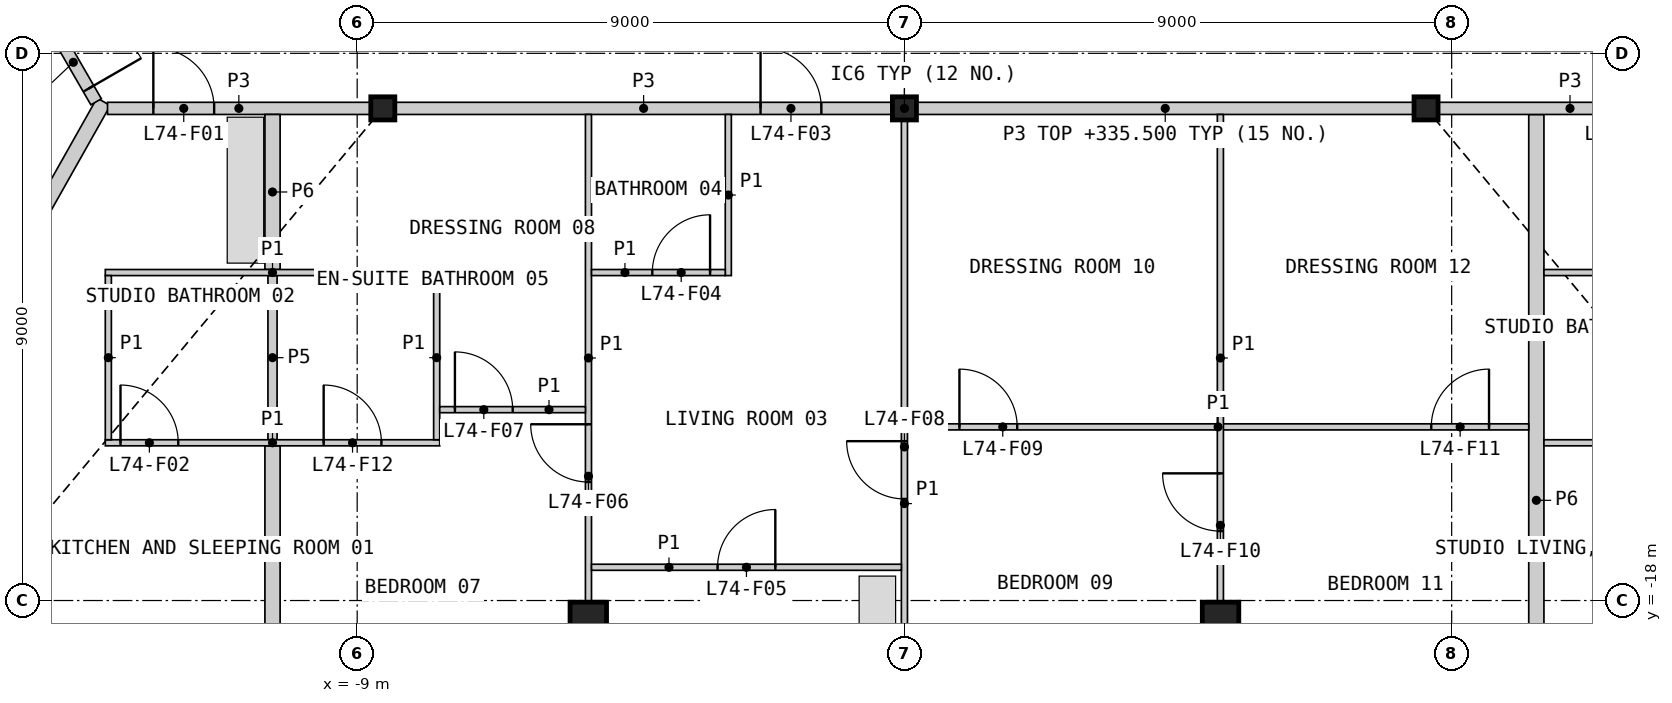
"""IFC4 building model, lengths in metres.
Left out: names, types, materials, properties, quantities, classifications, styles, units other than length and angle.
Written with IfcOpenShell. Run it as: python <this file> out.ifc"""

import sys

from ifc_helpers import new_model, si_unit, direction, frame, frame_2d, origin, origin_2d, place, context, subcontext, project, spatial, rectangle, hollow_rectangle, i_section, extrude, element, fill, save


model = new_model("IFC4")
c1 = context("Model", 3, precision=1e-05, world=origin(), true_north=direction((0.0, 1.0)))
c2 = subcontext(c1, "Body", "Model", "MODEL_VIEW")
j1 = project(units=[si_unit("LENGTHUNIT", "METRE"), si_unit("PLANEANGLEUNIT", "RADIAN")], contexts=[c1])
p1 = place(None, origin())
s1 = spatial("IfcSite", under=j1, at=p1, CompositionType="ELEMENT")
p2 = place(p1, origin())
s2 = spatial("IfcBuilding", under=s1, at=p2, CompositionType="ELEMENT")
p3 = place(p2, frame((0.0, 0.0, 332.4)))
s3 = spatial("IfcBuildingStorey", under=s2, at=p3, CompositionType="ELEMENT", Elevation=332.4)
for number, where, z_axis, x_axis in (
    (1, (-5.199, -18.327, 0.0), (0.0, 0.0, 1.0), (1.0, 0.0, 0.0)),
    (2, (5.199, -18.327, 0.0), (0.0, 0.0, 1.0), (1.0, 0.0, 0.0)),
):
    element("IfcColumn", number, at=place(p3, frame(where, z_axis=z_axis, x_axis=x_axis)), inside=s3, PredefinedType="COLUMN", context=c2, shape_type="SweptSolid", body=[
        extrude(hollow_rectangle(XDim=0.6, YDim=0.6, WallThickness=0.04, at=origin_2d()), origin(), (0.0, 0.0, 1.0), 3.4),
    ])
for number, where, z_axis, x_axis in (
    (3, (-8.578, -9.906, 0.0), (0.0, 0.0, 1.0), (1.0, 0.0, 0.0)),
    (4, (0.0, -9.906, 0.0), (0.0, 0.0, 1.0), (1.0, 0.0, 0.0)),
    (5, (8.578, -9.906, 0.0), (0.0, 0.0, 1.0), (1.0, 0.0, 0.0)),
):
    element("IfcColumn", number, at=place(p3, frame(where, z_axis=z_axis, x_axis=x_axis)), inside=s3, PredefinedType="COLUMN", context=c2, shape_type="SweptSolid", body=[
        extrude(i_section(OverallWidth=0.396, OverallDepth=0.381, WebThickness=0.019, FlangeThickness=0.03, at=origin_2d()), origin(), (0.0, 0.0, 1.0), 3.4),
    ])
p4 = place(p3, frame((-20.376, -22.582, 0.0), z_axis=(0.0, 0.0, 1.0), x_axis=(0.491057132664, 0.871127368678, 0.0)))
e6 = element("IfcWall", 6, at=p4, inside=s3, PredefinedType="PARTITIONING", context=c2, shape_type="SweptSolid", body=[
    extrude(rectangle(XDim=14.677, YDim=0.25, at=frame_2d((7.338, 0.0))), origin(), (0.0, 0.0, 1.0), 2.33),
])
p5 = place(p3, frame((10.393, -22.698, 0.0), z_axis=(0.0, 0.0, 1.0), x_axis=(0.0, 1.0, 0.0)))
e7 = element("IfcWall", 7, at=p5, inside=s3, PredefinedType="PARTITIONING", context=c2, shape_type="SweptSolid", body=[
    extrude(rectangle(XDim=12.692, YDim=0.25, at=frame_2d((6.346, 0.0))), origin(), (0.0, 0.0, 1.0), 2.33),
])
p6 = place(p3, frame((0.208, -9.906, 0.0), z_axis=(0.0, 0.0, 1.0), x_axis=(1.0, 0.0, 0.0)))
e8 = element("IfcWall", 8, at=p6, inside=s3, PredefinedType="PARTITIONING", context=c2, shape_type="SweptSolid", body=[
    extrude(rectangle(XDim=8.163, YDim=0.2, at=frame_2d((4.082, 0.0))), origin(), (0.0, 0.0, 1.0), 3.1),
])
p7 = place(p3, frame((-8.371, -9.906, 0.0), z_axis=(0.0, 0.0, 1.0), x_axis=(1.0, 0.0, 0.0)))
e9 = element("IfcWall", 9, at=p7, inside=s3, PredefinedType="PARTITIONING", context=c2, shape_type="SweptSolid", body=[
    extrude(rectangle(XDim=8.163, YDim=0.2, at=frame_2d((4.082, 0.0))), origin(), (0.0, 0.0, 1.0), 3.1),
])
p8 = place(p7, frame((6.004, 0.0, 0.0)))
e10 = element("IfcOpeningElement", 10, at=p8, cuts=e9, PredefinedType="OPENING", context=c2, shape_type="SweptSolid", body=[
    extrude(rectangle(XDim=1.0, YDim=2.1, at=frame_2d((0.5, 1.05))), frame((0.0, 0.11, 0.0), z_axis=(0.0, -1.0, 0.0), x_axis=(1.0, 0.0, 0.0)), (0.0, 0.0, 1.0), 0.22),
])
p9 = place(p3, frame((-10.393, -22.698, 0.0), z_axis=(0.0, 0.0, 1.0), x_axis=(0.0, 1.0, 0.0)))
e11 = element("IfcWall", 11, at=p9, inside=s3, PredefinedType="PARTITIONING", context=c2, shape_type="SweptSolid", body=[
    extrude(rectangle(XDim=7.242, YDim=0.25, at=frame_2d((3.621, 0.0))), origin(), (0.0, 0.0, 1.0), 2.33),
])
p10 = place(p3, frame((-13.106, -9.906, 0.0), z_axis=(0.0, 0.0, 1.0), x_axis=(1.0, 0.0, 0.0)))
e12 = element("IfcWall", 12, at=p10, inside=s3, PredefinedType="PARTITIONING", context=c2, shape_type="SweptSolid", body=[
    extrude(rectangle(XDim=4.32, YDim=0.2, at=frame_2d((2.16, 0.0))), origin(), (0.0, 0.0, 1.0), 3.1),
])
p11 = place(p10, frame((0.753, 0.0, 0.0)))
e13 = element("IfcOpeningElement", 13, at=p11, cuts=e12, PredefinedType="OPENING", context=c2, shape_type="SweptSolid", body=[
    extrude(rectangle(XDim=1.0, YDim=2.1, at=frame_2d((0.5, 1.05))), frame((0.0, 0.11, 0.0), z_axis=(0.0, -1.0, 0.0), x_axis=(1.0, 0.0, 0.0)), (0.0, 0.0, 1.0), 0.22),
])
p12 = place(p3, frame((8.786, -9.906, 0.0), z_axis=(0.0, 0.0, 1.0), x_axis=(1.0, 0.0, 0.0)))
e14 = element("IfcWall", 14, at=p12, inside=s3, PredefinedType="PARTITIONING", context=c2, shape_type="SweptSolid", body=[
    extrude(rectangle(XDim=4.32, YDim=0.2, at=frame_2d((2.16, 0.0))), origin(), (0.0, 0.0, 1.0), 3.1),
])
p13 = place(p12, frame((2.566, 0.0, 0.0)))
e15 = element("IfcOpeningElement", 15, at=p13, cuts=e14, PredefinedType="OPENING", context=c2, shape_type="SweptSolid", body=[
    extrude(rectangle(XDim=1.0, YDim=2.1, at=frame_2d((0.5, 1.05))), frame((0.0, 0.11, 0.0), z_axis=(0.0, -1.0, 0.0), x_axis=(1.0, 0.0, 0.0)), (0.0, 0.0, 1.0), 0.22),
])
p14 = place(p3, frame((-15.131, -6.614, 0.0), z_axis=(0.0, 0.0, 1.0), x_axis=(0.499967746641, -0.866044024469, 0.0)))
e16 = element("IfcWall", 16, at=p14, inside=s3, PredefinedType="PARTITIONING", context=c2, shape_type="SweptSolid", body=[
    extrude(rectangle(XDim=3.676, YDim=0.2, at=frame_2d((1.838, 0.0))), origin(), (0.0, 0.0, 1.0), 3.1),
])
p15 = place(p14, frame((2.426, 0.0, 0.0)))
e17 = element("IfcOpeningElement", 17, at=p15, cuts=e16, PredefinedType="OPENING", context=c2, shape_type="SweptSolid", body=[
    extrude(rectangle(XDim=1.0, YDim=2.1, at=frame_2d((0.5, 1.05))), frame((0.0, 0.11, 0.0), z_axis=(0.0, -1.0, 0.0), x_axis=(1.0, 0.0, 0.0)), (0.0, 0.0, 1.0), 0.22),
])
p16 = place(p3, frame((-10.393, -12.556, 0.0), z_axis=(0.0, 0.0, 1.0), x_axis=(0.0, 1.0, 0.0)))
e18 = element("IfcWall", 18, at=p16, inside=s3, PredefinedType="PARTITIONING", context=c2, shape_type="SweptSolid", body=[
    extrude(rectangle(XDim=2.55, YDim=0.25, at=frame_2d((1.275, 0.0))), origin(), (0.0, 0.0, 1.0), 2.33),
])
p17 = place(p3, frame((-10.393, -15.356, 0.0), z_axis=(0.0, 0.0, 1.0), x_axis=(0.0, 1.0, 0.0)))
e19 = element("IfcWall", 19, at=p17, inside=s3, PredefinedType="PLUMBINGWALL", context=c2, shape_type="SweptSolid", body=[
    extrude(rectangle(XDim=2.7, YDim=0.15, at=frame_2d((1.35, 0.0))), origin(), (0.0, 0.0, 1.0), 2.33),
])
p18 = place(p3, frame((0.0, -22.698, 0.0), z_axis=(0.0, 0.0, 1.0), x_axis=(0.0, 1.0, 0.0)))
e20 = element("IfcWall", 20, at=p18, inside=s3, PredefinedType="PARTITIONING", context=c2, shape_type="SweptSolid", body=[
    extrude(rectangle(XDim=12.585, YDim=0.1, at=frame_2d((6.292, 0.0))), origin(), (0.0, 0.0, 1.0), 2.33),
])
p19 = place(p18, frame((6.369, 0.0, 0.0)))
e21 = element("IfcOpeningElement", 21, at=p19, cuts=e20, PredefinedType="OPENING", context=c2, shape_type="SweptSolid", body=[
    extrude(rectangle(XDim=0.95, YDim=2.1, at=frame_2d((0.475, 1.05))), frame((0.0, 0.06, 0.0), z_axis=(0.0, -1.0, 0.0), x_axis=(1.0, 0.0, 0.0)), (0.0, 0.0, 1.0), 0.12),
])
p20 = place(p3, frame((0.05, -15.144, 0.0), z_axis=(0.0, 0.0, 1.0), x_axis=(1.0, 0.0, 0.0)))
e22 = element("IfcWall", 22, at=p20, inside=s3, PredefinedType="PARTITIONING", context=c2, shape_type="SweptSolid", body=[
    extrude(rectangle(XDim=10.218, YDim=0.1, at=frame_2d((5.109, 0.0))), origin(), (0.0, 0.0, 1.0), 2.33),
])
p21 = place(p20, frame((0.855, 0.0, 0.0)))
e23 = element("IfcOpeningElement", 23, at=p21, cuts=e22, PredefinedType="OPENING", context=c2, shape_type="SweptSolid", body=[
    extrude(rectangle(XDim=0.95, YDim=2.1, at=frame_2d((0.475, 1.05))), frame((0.0, 0.06, 0.0), z_axis=(0.0, -1.0, 0.0), x_axis=(1.0, 0.0, 0.0)), (0.0, 0.0, 1.0), 0.12),
])
p22 = place(p20, frame((8.615, 0.0, 0.0)))
e24 = element("IfcOpeningElement", 24, at=p22, cuts=e22, PredefinedType="OPENING", context=c2, shape_type="SweptSolid", body=[
    extrude(rectangle(XDim=0.95, YDim=2.1, at=frame_2d((0.475, 1.05))), frame((0.0, 0.06, 0.0), z_axis=(0.0, -1.0, 0.0), x_axis=(1.0, 0.0, 0.0)), (0.0, 0.0, 1.0), 0.12),
])
p23 = place(p3, frame((-5.196, -18.017, 0.0), z_axis=(0.0, 0.0, 1.0), x_axis=(0.0, 1.0, 0.0)))
e25 = element("IfcWall", 25, at=p23, inside=s3, PredefinedType="PARTITIONING", context=c2, shape_type="SweptSolid", body=[
    extrude(rectangle(XDim=8.011, YDim=0.1, at=frame_2d((4.006, 0.0))), origin(), (0.0, 0.0, 1.0), 2.33),
])
p24 = place(p23, frame((1.966, 0.0, 0.0)))
e26 = element("IfcOpeningElement", 26, at=p24, cuts=e25, PredefinedType="OPENING", context=c2, shape_type="SweptSolid", body=[
    extrude(rectangle(XDim=0.95, YDim=2.1, at=frame_2d((0.475, 1.05))), frame((0.0, 0.06, 0.0), z_axis=(0.0, -1.0, 0.0), x_axis=(1.0, 0.0, 0.0)), (0.0, 0.0, 1.0), 0.12),
])
p25 = place(p3, frame((5.196, -18.017, 0.0), z_axis=(0.0, 0.0, 1.0), x_axis=(0.0, 1.0, 0.0)))
e27 = element("IfcWall", 27, at=p25, inside=s3, PredefinedType="PARTITIONING", context=c2, shape_type="SweptSolid", body=[
    extrude(rectangle(XDim=8.011, YDim=0.1, at=frame_2d((4.006, 0.0))), origin(), (0.0, 0.0, 1.0), 2.33),
])
p26 = place(p25, frame((1.158, 0.0, 0.0)))
e28 = element("IfcOpeningElement", 28, at=p26, cuts=e27, PredefinedType="OPENING", context=c2, shape_type="SweptSolid", body=[
    extrude(rectangle(XDim=0.95, YDim=2.1, at=frame_2d((0.475, 1.05))), frame((0.0, 0.06, 0.0), z_axis=(0.0, -1.0, 0.0), x_axis=(1.0, 0.0, 0.0)), (0.0, 0.0, 1.0), 0.12),
])
p27 = place(p3, frame((-13.143, -12.606, 0.0), z_axis=(0.0, 0.0, 1.0), x_axis=(1.0, 0.0, 0.0)))
e29 = element("IfcWall", 29, at=p27, inside=s3, PredefinedType="PARTITIONING", context=c2, shape_type="SweptSolid", body=[
    extrude(rectangle(XDim=5.5, YDim=0.1, at=frame_2d((2.75, 0.0))), origin(), (0.0, 0.0, 1.0), 2.33),
])
p28 = place(p3, frame((-13.143, -15.406, 0.0), z_axis=(0.0, 0.0, 1.0), x_axis=(1.0, 0.0, 0.0)))
e30 = element("IfcWall", 30, at=p28, inside=s3, PredefinedType="PARTITIONING", context=c2, shape_type="SweptSolid", body=[
    extrude(rectangle(XDim=5.5, YDim=0.1, at=frame_2d((2.75, 0.0))), origin(), (0.0, 0.0, 1.0), 2.33),
])
p29 = place(p28, frame((0.25, 0.0, 0.0)))
e31 = element("IfcOpeningElement", 31, at=p29, cuts=e30, PredefinedType="OPENING", context=c2, shape_type="SweptSolid", body=[
    extrude(rectangle(XDim=0.95, YDim=2.1, at=frame_2d((0.475, 1.05))), frame((0.0, 0.06, 0.0), z_axis=(0.0, -1.0, 0.0), x_axis=(1.0, 0.0, 0.0)), (0.0, 0.0, 1.0), 0.12),
])
p30 = place(p28, frame((3.591, 0.0, 0.0)))
e32 = element("IfcOpeningElement", 32, at=p30, cuts=e30, PredefinedType="OPENING", context=c2, shape_type="SweptSolid", body=[
    extrude(rectangle(XDim=0.95, YDim=2.1, at=frame_2d((0.475, 1.05))), frame((0.0, 0.06, 0.0), z_axis=(0.0, -1.0, 0.0), x_axis=(1.0, 0.0, 0.0)), (0.0, 0.0, 1.0), 0.12),
])
p31 = place(p3, frame((-5.146, -17.453, 0.0), z_axis=(0.0, 0.0, 1.0), x_axis=(1.0, 0.0, 0.0)))
e33 = element("IfcWall", 33, at=p31, inside=s3, PredefinedType="PARTITIONING", context=c2, shape_type="SweptSolid", body=[
    extrude(rectangle(XDim=5.096, YDim=0.1, at=frame_2d((2.548, 0.0))), origin(), (0.0, 0.0, 1.0), 2.33),
])
p32 = place(p31, frame((2.073, 0.0, 0.0)))
e34 = element("IfcOpeningElement", 34, at=p32, cuts=e33, PredefinedType="OPENING", context=c2, shape_type="SweptSolid", body=[
    extrude(rectangle(XDim=0.95, YDim=2.1, at=frame_2d((0.475, 1.05))), frame((0.0, 0.06, 0.0), z_axis=(0.0, -1.0, 0.0), x_axis=(1.0, 0.0, 0.0)), (0.0, 0.0, 1.0), 0.12),
])
for number, where, z_axis, x_axis in (
    (35, (-13.093, -15.356, 0.0), (0.0, 0.0, 1.0), (0.0, 1.0, 0.0)),
    (36, (-7.692, -15.356, 0.0), (0.0, 0.0, 1.0), (0.0, 1.0, 0.0)),
):
    element("IfcWall", number, at=place(p3, frame(where, z_axis=z_axis, x_axis=x_axis)), inside=s3, PredefinedType="PARTITIONING", context=c2, shape_type="SweptSolid", body=[
        extrude(rectangle(XDim=2.7, YDim=0.1, at=frame_2d((1.35, 0.0))), origin(), (0.0, 0.0, 1.0), 2.33),
    ])
p33 = place(p3, frame((-2.896, -12.656, 0.0), z_axis=(0.0, 0.0, 1.0), x_axis=(0.0, 1.0, 0.0)))
e37 = element("IfcWall", 37, at=p33, inside=s3, PredefinedType="PARTITIONING", context=c2, shape_type="SweptSolid", body=[
    extrude(rectangle(XDim=2.65, YDim=0.1, at=frame_2d((1.325, 0.0))), origin(), (0.0, 0.0, 1.0), 2.33),
])
p34 = place(p3, frame((10.518, -12.606, 0.0), z_axis=(0.0, 0.0, 1.0), x_axis=(1.0, 0.0, 0.0)))
e38 = element("IfcWall", 38, at=p34, inside=s3, PredefinedType="PARTITIONING", context=c2, shape_type="SweptSolid", body=[
    extrude(rectangle(XDim=2.525, YDim=0.1, at=frame_2d((1.262, 0.0))), origin(), (0.0, 0.0, 1.0), 2.33),
])
p35 = place(p3, frame((10.518, -15.406, 0.0), z_axis=(0.0, 0.0, 1.0), x_axis=(1.0, 0.0, 0.0)))
e39 = element("IfcWall", 39, at=p35, inside=s3, PredefinedType="PARTITIONING", context=c2, shape_type="SweptSolid", body=[
    extrude(rectangle(XDim=2.525, YDim=0.1, at=frame_2d((1.262, 0.0))), origin(), (0.0, 0.0, 1.0), 2.33),
])
p36 = place(p35, frame((1.325, 0.0, 0.0)))
e40 = element("IfcOpeningElement", 40, at=p36, cuts=e39, PredefinedType="OPENING", context=c2, shape_type="SweptSolid", body=[
    extrude(rectangle(XDim=0.95, YDim=2.1, at=frame_2d((0.475, 1.05))), frame((0.0, 0.06, 0.0), z_axis=(0.0, -1.0, 0.0), x_axis=(1.0, 0.0, 0.0)), (0.0, 0.0, 1.0), 0.12),
])
p37 = place(p3, frame((-7.643, -14.861, 0.0), z_axis=(0.0, 0.0, 1.0), x_axis=(1.0, 0.0, 0.0)))
e41 = element("IfcWall", 41, at=p37, inside=s3, PredefinedType="PARTITIONING", context=c2, shape_type="SweptSolid", body=[
    extrude(rectangle(XDim=2.396, YDim=0.1, at=frame_2d((1.198, 0.0))), origin(), (0.0, 0.0, 1.0), 2.33),
])
p38 = place(p37, frame((0.25, 0.0, 0.0)))
e42 = element("IfcOpeningElement", 42, at=p38, cuts=e41, PredefinedType="OPENING", context=c2, shape_type="SweptSolid", body=[
    extrude(rectangle(XDim=0.95, YDim=2.1, at=frame_2d((0.475, 1.05))), frame((0.0, 0.06, 0.0), z_axis=(0.0, -1.0, 0.0), x_axis=(1.0, 0.0, 0.0)), (0.0, 0.0, 1.0), 0.12),
])
p39 = place(p3, frame((-5.146, -12.606, 0.0), z_axis=(0.0, 0.0, 1.0), x_axis=(1.0, 0.0, 0.0)))
e43 = element("IfcWall", 43, at=p39, inside=s3, PredefinedType="PARTITIONING", context=c2, shape_type="SweptSolid", body=[
    extrude(rectangle(XDim=2.2, YDim=0.1, at=frame_2d((1.1, 0.0))), origin(), (0.0, 0.0, 1.0), 2.33),
])
p40 = place(p39, frame((1.0, 0.0, 0.0)))
e44 = element("IfcOpeningElement", 44, at=p40, cuts=e43, PredefinedType="OPENING", context=c2, shape_type="SweptSolid", body=[
    extrude(rectangle(XDim=0.95, YDim=2.1, at=frame_2d((0.475, 1.05))), frame((0.0, 0.06, 0.0), z_axis=(0.0, -1.0, 0.0), x_axis=(1.0, 0.0, 0.0)), (0.0, 0.0, 1.0), 0.12),
])
p41 = place(p11, origin())
e45 = element("IfcDoor", 45, at=p41, inside=s3, OperationType="SINGLE_SWING_LEFT", PredefinedType="DOOR", context=c2, shape_type="SweptSolid", body=[
    extrude(rectangle(XDim=1.0, YDim=2.1, at=frame_2d((0.5, 1.05))), frame((0.0, 0.025, 0.0), z_axis=(0.0, -1.0, 0.0), x_axis=(1.0, 0.0, 0.0)), (0.0, 0.0, 1.0), 0.05),
])
fill(e13, e45)
p42 = place(p29, origin())
e46 = element("IfcDoor", 46, at=p42, inside=s3, OperationType="SINGLE_SWING_LEFT", PredefinedType="DOOR", context=c2, shape_type="SweptSolid", body=[
    extrude(rectangle(XDim=0.95, YDim=2.1, at=frame_2d((0.475, 1.05))), frame((0.0, 0.025, 0.0), z_axis=(0.0, -1.0, 0.0), x_axis=(1.0, 0.0, 0.0)), (0.0, 0.0, 1.0), 0.05),
])
fill(e31, e46)
p43 = place(p8, origin())
e47 = element("IfcDoor", 47, at=p43, inside=s3, OperationType="SINGLE_SWING_LEFT", PredefinedType="DOOR", context=c2, shape_type="SweptSolid", body=[
    extrude(rectangle(XDim=1.0, YDim=2.1, at=frame_2d((0.5, 1.05))), frame((0.0, 0.025, 0.0), z_axis=(0.0, -1.0, 0.0), x_axis=(1.0, 0.0, 0.0)), (0.0, 0.0, 1.0), 0.05),
])
fill(e10, e47)
p44 = place(p40, origin())
e48 = element("IfcDoor", 48, at=p44, inside=s3, OperationType="SINGLE_SWING_RIGHT", PredefinedType="DOOR", context=c2, shape_type="SweptSolid", body=[
    extrude(rectangle(XDim=0.95, YDim=2.1, at=frame_2d((0.475, 1.05))), frame((0.0, 0.025, 0.0), z_axis=(0.0, -1.0, 0.0), x_axis=(1.0, 0.0, 0.0)), (0.0, 0.0, 1.0), 0.05),
])
fill(e44, e48)
p45 = place(p32, origin())
e49 = element("IfcDoor", 49, at=p45, inside=s3, OperationType="SINGLE_SWING_RIGHT", PredefinedType="DOOR", context=c2, shape_type="SweptSolid", body=[
    extrude(rectangle(XDim=0.95, YDim=2.1, at=frame_2d((0.475, 1.05))), frame((0.0, 0.025, 0.0), z_axis=(0.0, -1.0, 0.0), x_axis=(1.0, 0.0, 0.0)), (0.0, 0.0, 1.0), 0.05),
])
fill(e34, e49)
p46 = place(p24, origin())
e50 = element("IfcDoor", 50, at=p46, inside=s3, OperationType="SINGLE_SWING_RIGHT", PredefinedType="DOOR", context=c2, shape_type="SweptSolid", body=[
    extrude(rectangle(XDim=0.95, YDim=2.1, at=frame_2d((0.475, 1.05))), frame((0.0, 0.025, 0.0), z_axis=(0.0, -1.0, 0.0), x_axis=(1.0, 0.0, 0.0)), (0.0, 0.0, 1.0), 0.05),
])
fill(e26, e50)
p47 = place(p38, origin())
e51 = element("IfcDoor", 51, at=p47, inside=s3, OperationType="SINGLE_SWING_LEFT", PredefinedType="DOOR", context=c2, shape_type="SweptSolid", body=[
    extrude(rectangle(XDim=0.95, YDim=2.1, at=frame_2d((0.475, 1.05))), frame((0.0, 0.025, 0.0), z_axis=(0.0, -1.0, 0.0), x_axis=(1.0, 0.0, 0.0)), (0.0, 0.0, 1.0), 0.05),
])
fill(e42, e51)
p48 = place(p19, origin())
e52 = element("IfcDoor", 52, at=p48, inside=s3, OperationType="SINGLE_SWING_RIGHT", PredefinedType="DOOR", context=c2, shape_type="SweptSolid", body=[
    extrude(rectangle(XDim=0.95, YDim=2.1, at=frame_2d((0.475, 1.05))), frame((0.0, 0.025, 0.0), z_axis=(0.0, -1.0, 0.0), x_axis=(1.0, 0.0, 0.0)), (0.0, 0.0, 1.0), 0.05),
])
fill(e21, e52)
p49 = place(p21, origin())
e53 = element("IfcDoor", 53, at=p49, inside=s3, OperationType="SINGLE_SWING_LEFT", PredefinedType="DOOR", context=c2, shape_type="SweptSolid", body=[
    extrude(rectangle(XDim=0.95, YDim=2.1, at=frame_2d((0.475, 1.05))), frame((0.0, 0.025, 0.0), z_axis=(0.0, -1.0, 0.0), x_axis=(1.0, 0.0, 0.0)), (0.0, 0.0, 1.0), 0.05),
])
fill(e23, e53)
p50 = place(p26, origin())
e54 = element("IfcDoor", 54, at=p50, inside=s3, OperationType="SINGLE_SWING_RIGHT", PredefinedType="DOOR", context=c2, shape_type="SweptSolid", body=[
    extrude(rectangle(XDim=0.95, YDim=2.1, at=frame_2d((0.475, 1.05))), frame((0.0, 0.025, 0.0), z_axis=(0.0, -1.0, 0.0), x_axis=(1.0, 0.0, 0.0)), (0.0, 0.0, 1.0), 0.05),
])
fill(e28, e54)
p51 = place(p22, origin())
e55 = element("IfcDoor", 55, at=p51, inside=s3, OperationType="SINGLE_SWING_RIGHT", PredefinedType="DOOR", context=c2, shape_type="SweptSolid", body=[
    extrude(rectangle(XDim=0.95, YDim=2.1, at=frame_2d((0.475, 1.05))), frame((0.0, 0.025, 0.0), z_axis=(0.0, -1.0, 0.0), x_axis=(1.0, 0.0, 0.0)), (0.0, 0.0, 1.0), 0.05),
])
fill(e24, e55)
p52 = place(p30, origin())
e56 = element("IfcDoor", 56, at=p52, inside=s3, OperationType="SINGLE_SWING_LEFT", PredefinedType="DOOR", context=c2, shape_type="SweptSolid", body=[
    extrude(rectangle(XDim=0.95, YDim=2.1, at=frame_2d((0.475, 1.05))), frame((0.0, 0.025, 0.0), z_axis=(0.0, -1.0, 0.0), x_axis=(1.0, 0.0, 0.0)), (0.0, 0.0, 1.0), 0.05),
])
fill(e32, e56)
p53 = place(p15, origin())
e57 = element("IfcDoor", 57, at=p53, inside=s3, OperationType="SINGLE_SWING_RIGHT", PredefinedType="DOOR", context=c2, shape_type="SweptSolid", body=[
    extrude(rectangle(XDim=1.0, YDim=2.1, at=frame_2d((0.5, 1.05))), frame((0.0, 0.025, 0.0), z_axis=(0.0, -1.0, 0.0), x_axis=(1.0, 0.0, 0.0)), (0.0, 0.0, 1.0), 0.05),
])
fill(e17, e57)
save(model, sys.argv[1])
